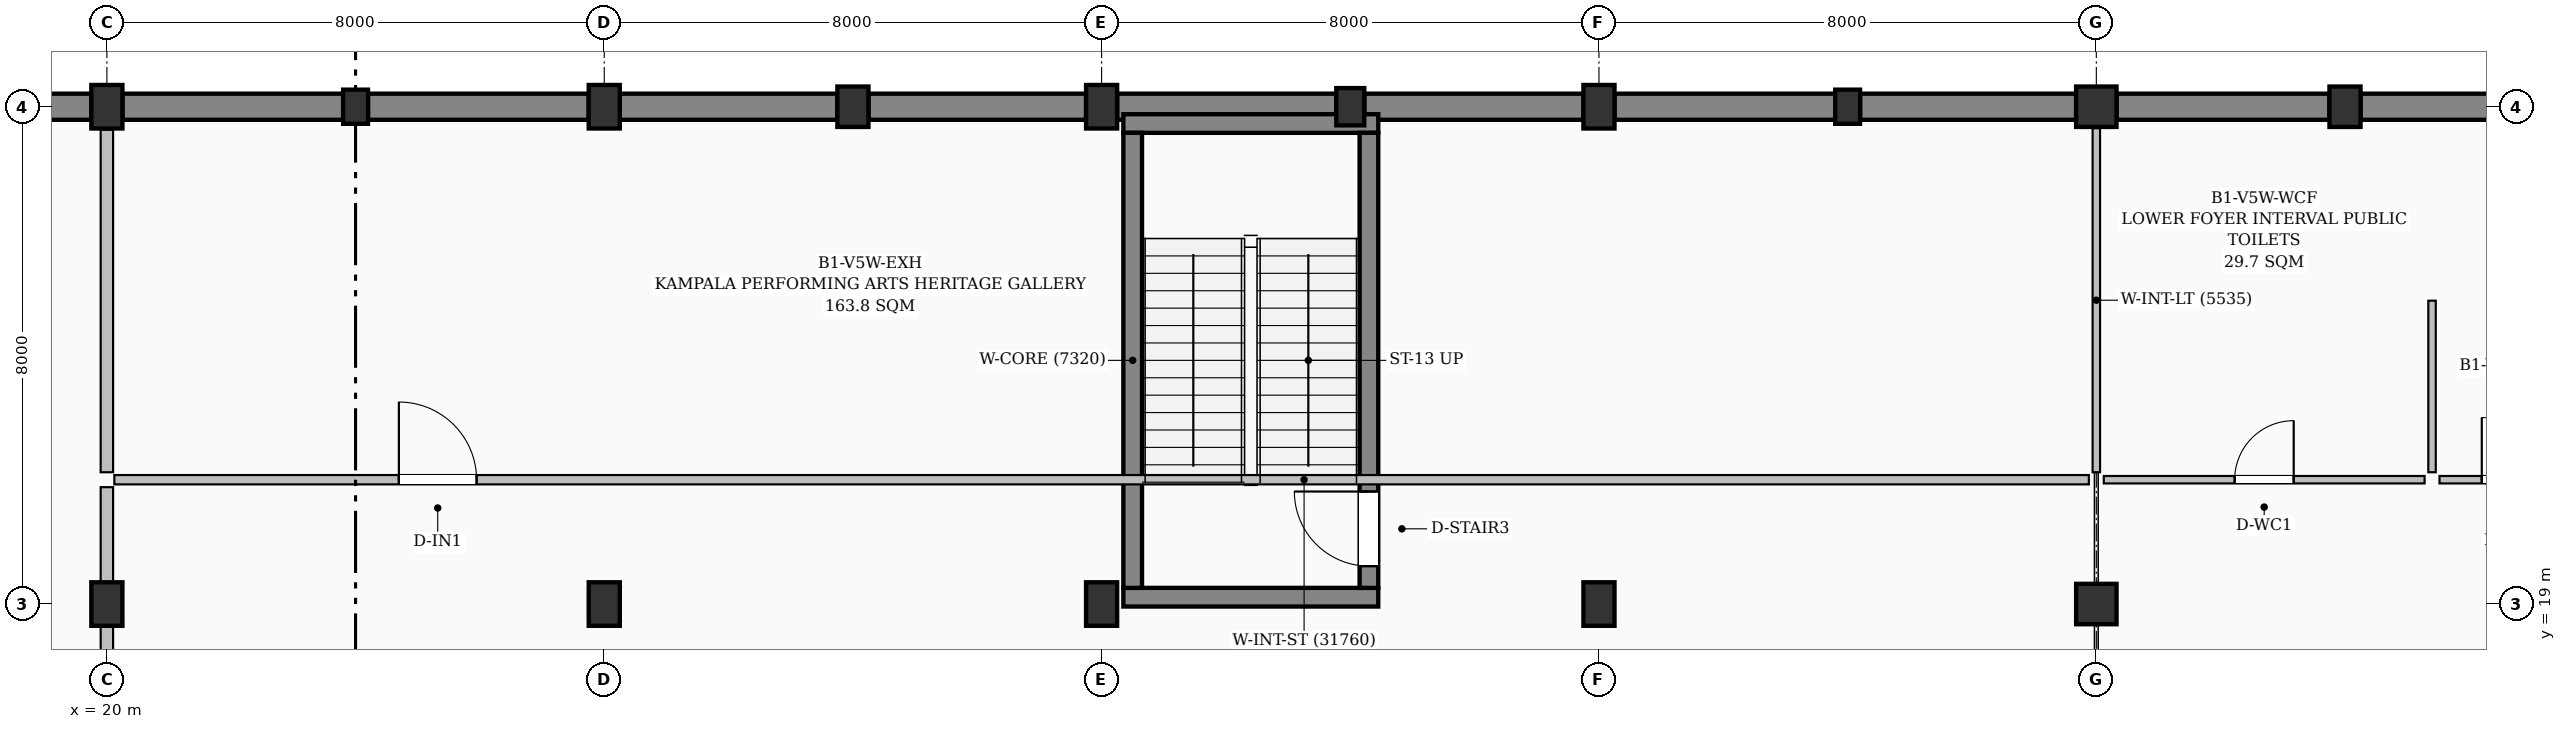
"""IFC4 building model, lengths in metres.
Left out: names, types, materials, properties, quantities, classifications, styles, units other than length and angle.
Written with IfcOpenShell. Run it as: python <this file> out.ifc"""

import sys

from ifc_helpers import new_model, si_unit, direction, frame, frame_2d, origin, origin_2d, place, context, subcontext, project, spatial, rectangle, extrude, element, fill, save


model = new_model("IFC4")
c1 = context("Model", 3, precision=1e-05, world=origin(), true_north=direction((0.0, 1.0)))
c2 = subcontext(c1, "Body", "Model", "MODEL_VIEW")
j1 = project(units=[si_unit("LENGTHUNIT", "METRE"), si_unit("PLANEANGLEUNIT", "RADIAN")], contexts=[c1])
p1 = place(None, origin())
s1 = spatial("IfcSite", under=j1, at=p1, CompositionType="ELEMENT")
p2 = place(p1, origin())
s2 = spatial("IfcBuilding", under=s1, at=p2, CompositionType="ELEMENT")
p3 = place(p2, frame((0.0, 0.0, -4.8)))
s3 = spatial("IfcBuildingStorey", under=s2, at=p3, CompositionType="ELEMENT", Elevation=-4.8)
for number, where, z_axis, x_axis in (
    (1, (20.0, 19.0, -0.38), (0.0, 0.0, 1.0), (1.0, 0.0, 0.0)),
    (2, (20.0, 27.0, -0.38), (0.0, 0.0, 1.0), (1.0, 0.0, 0.0)),
):
    element("IfcColumn", number, at=place(p3, frame(where, z_axis=z_axis, x_axis=x_axis)), inside=s3, PredefinedType="COLUMN", context=c2, shape_type="SweptSolid", body=[
        extrude(rectangle(XDim=0.5, YDim=0.7, at=origin_2d()), origin(), (0.0, 0.0, 1.0), 5.18),
    ])
p4 = place(p3, frame((24.0, 27.0, -0.38), z_axis=(0.0, 0.0, 1.0), x_axis=(1.0, 0.0, 0.0)))
e3 = element("IfcColumn", 3, at=p4, inside=s3, PredefinedType="PILASTER", context=c2, shape_type="SweptSolid", body=[
    extrude(rectangle(XDim=0.4, YDim=0.55, at=origin_2d()), origin(), (0.0, 0.0, 1.0), 5.18),
])
for number, where, z_axis, x_axis in (
    (4, (28.0, 19.0, -0.38), (0.0, 0.0, 1.0), (1.0, 0.0, 0.0)),
    (5, (28.0, 27.0, -0.38), (0.0, 0.0, 1.0), (1.0, 0.0, 0.0)),
):
    element("IfcColumn", number, at=place(p3, frame(where, z_axis=z_axis, x_axis=x_axis)), inside=s3, PredefinedType="COLUMN", context=c2, shape_type="SweptSolid", body=[
        extrude(rectangle(XDim=0.5, YDim=0.7, at=origin_2d()), origin(), (0.0, 0.0, 1.0), 5.18),
    ])
p5 = place(p3, frame((32.0, 27.0, -0.38), z_axis=(0.0, 0.0, 1.0), x_axis=(1.0, 0.0, 0.0)))
e6 = element("IfcColumn", 6, at=p5, inside=s3, PredefinedType="PILASTER", context=c2, shape_type="SweptSolid", body=[
    extrude(rectangle(XDim=0.5, YDim=0.65, at=origin_2d()), origin(), (0.0, 0.0, 1.0), 5.18),
])
for number, where, z_axis, x_axis in (
    (7, (36.0, 19.0, -0.38), (0.0, 0.0, 1.0), (1.0, 0.0, 0.0)),
    (8, (36.0, 27.0, -0.38), (0.0, 0.0, 1.0), (1.0, 0.0, 0.0)),
):
    element("IfcColumn", number, at=place(p3, frame(where, z_axis=z_axis, x_axis=x_axis)), inside=s3, PredefinedType="COLUMN", context=c2, shape_type="SweptSolid", body=[
        extrude(rectangle(XDim=0.5, YDim=0.7, at=origin_2d()), origin(), (0.0, 0.0, 1.0), 5.18),
    ])
p6 = place(p3, frame((40.0, 27.0, -0.38), z_axis=(0.0, 0.0, 1.0), x_axis=(1.0, 0.0, 0.0)))
e9 = element("IfcColumn", 9, at=p6, inside=s3, PredefinedType="PILASTER", context=c2, shape_type="SweptSolid", body=[
    extrude(rectangle(XDim=0.45, YDim=0.6, at=origin_2d()), origin(), (0.0, 0.0, 1.0), 5.18),
])
for number, where, z_axis, x_axis in (
    (10, (44.0, 19.0, -0.38), (0.0, 0.0, 1.0), (1.0, 0.0, 0.0)),
    (11, (44.0, 27.0, -0.38), (0.0, 0.0, 1.0), (1.0, 0.0, 0.0)),
):
    element("IfcColumn", number, at=place(p3, frame(where, z_axis=z_axis, x_axis=x_axis)), inside=s3, PredefinedType="COLUMN", context=c2, shape_type="SweptSolid", body=[
        extrude(rectangle(XDim=0.5, YDim=0.7, at=origin_2d()), origin(), (0.0, 0.0, 1.0), 5.18),
    ])
p7 = place(p3, frame((48.0, 27.0, -0.38), z_axis=(0.0, 0.0, 1.0), x_axis=(1.0, 0.0, 0.0)))
e12 = element("IfcColumn", 12, at=p7, inside=s3, PredefinedType="PILASTER", context=c2, shape_type="SweptSolid", body=[
    extrude(rectangle(XDim=0.4, YDim=0.55, at=origin_2d()), origin(), (0.0, 0.0, 1.0), 5.18),
])
for number, where, z_axis, x_axis in (
    (13, (52.0, 19.0, -0.38), (0.0, 0.0, 1.0), (1.0, 0.0, 0.0)),
    (14, (52.0, 27.0, -0.38), (0.0, 0.0, 1.0), (1.0, 0.0, 0.0)),
):
    element("IfcColumn", number, at=place(p3, frame(where, z_axis=z_axis, x_axis=x_axis)), inside=s3, PredefinedType="COLUMN", context=c2, shape_type="SweptSolid", body=[
        extrude(rectangle(XDim=0.65, YDim=0.65, at=origin_2d()), origin(), (0.0, 0.0, 1.0), 5.18),
    ])
p8 = place(p3, frame((56.0, 27.0, -0.38), z_axis=(0.0, 0.0, 1.0), x_axis=(1.0, 0.0, 0.0)))
e15 = element("IfcColumn", 15, at=p8, inside=s3, PredefinedType="PILASTER", context=c2, shape_type="SweptSolid", body=[
    extrude(rectangle(XDim=0.5, YDim=0.65, at=origin_2d()), origin(), (0.0, 0.0, 1.0), 5.18),
])
p9 = place(p3, frame((16.225, 27.0, 0.0), z_axis=(0.0, 0.0, 1.0), x_axis=(1.0, 0.0, 0.0)))
e16 = element("IfcWall", 16, at=p9, inside=s3, PredefinedType="USERDEFINED", context=c2, shape_type="SweptSolid", body=[
    extrude(rectangle(XDim=3.525, YDim=0.42, at=frame_2d((1.762, 0.0))), origin(), (0.0, 0.0, 1.0), 3.85),
])
for number, where, z_axis, x_axis in (
    (17, (20.25, 27.0, 0.0), (0.0, 0.0, 1.0), (1.0, 0.0, 0.0)),
    (18, (24.2, 27.0, 0.0), (0.0, 0.0, 1.0), (1.0, 0.0, 0.0)),
):
    element("IfcWall", number, at=place(p3, frame(where, z_axis=z_axis, x_axis=x_axis)), inside=s3, PredefinedType="USERDEFINED", context=c2, shape_type="SweptSolid", body=[
        extrude(rectangle(XDim=3.55, YDim=0.42, at=frame_2d((1.775, 0.0))), origin(), (0.0, 0.0, 1.0), 3.85),
    ])
for number, where, z_axis, x_axis in (
    (19, (28.25, 27.0, 0.0), (0.0, 0.0, 1.0), (1.0, 0.0, 0.0)),
    (20, (32.25, 27.0, 0.0), (0.0, 0.0, 1.0), (1.0, 0.0, 0.0)),
):
    element("IfcWall", number, at=place(p3, frame(where, z_axis=z_axis, x_axis=x_axis)), inside=s3, PredefinedType="USERDEFINED", context=c2, shape_type="SweptSolid", body=[
        extrude(rectangle(XDim=3.5, YDim=0.42, at=frame_2d((1.75, 0.0))), origin(), (0.0, 0.0, 1.0), 3.85),
    ])
for number, where, z_axis, x_axis in (
    (21, (36.25, 27.0, 0.0), (0.0, 0.0, 1.0), (1.0, 0.0, 0.0)),
    (22, (40.225, 27.0, 0.0), (0.0, 0.0, 1.0), (1.0, 0.0, 0.0)),
):
    element("IfcWall", number, at=place(p3, frame(where, z_axis=z_axis, x_axis=x_axis)), inside=s3, PredefinedType="USERDEFINED", context=c2, shape_type="SweptSolid", body=[
        extrude(rectangle(XDim=3.525, YDim=0.42, at=frame_2d((1.762, 0.0))), origin(), (0.0, 0.0, 1.0), 3.85),
    ])
p10 = place(p3, frame((44.25, 27.0, 0.0), z_axis=(0.0, 0.0, 1.0), x_axis=(1.0, 0.0, 0.0)))
e23 = element("IfcWall", 23, at=p10, inside=s3, PredefinedType="USERDEFINED", context=c2, shape_type="SweptSolid", body=[
    extrude(rectangle(XDim=3.55, YDim=0.42, at=frame_2d((1.775, 0.0))), origin(), (0.0, 0.0, 1.0), 3.85),
])
p11 = place(p3, frame((48.2, 27.0, 0.0), z_axis=(0.0, 0.0, 1.0), x_axis=(1.0, 0.0, 0.0)))
e24 = element("IfcWall", 24, at=p11, inside=s3, PredefinedType="USERDEFINED", context=c2, shape_type="SweptSolid", body=[
    extrude(rectangle(XDim=3.475, YDim=0.42, at=frame_2d((1.738, 0.0))), origin(), (0.0, 0.0, 1.0), 3.85),
])
for number, where, z_axis, x_axis in (
    (25, (52.325, 27.0, 0.0), (0.0, 0.0, 1.0), (1.0, 0.0, 0.0)),
    (26, (56.25, 27.0, 0.0), (0.0, 0.0, 1.0), (1.0, 0.0, 0.0)),
):
    element("IfcWall", number, at=place(p3, frame(where, z_axis=z_axis, x_axis=x_axis)), inside=s3, PredefinedType="USERDEFINED", context=c2, shape_type="SweptSolid", body=[
        extrude(rectangle(XDim=3.425, YDim=0.42, at=frame_2d((1.712, 0.0))), origin(), (0.0, 0.0, 1.0), 3.85),
    ])
for number, where, z_axis, x_axis in (
    (27, (36.35, 19.11, -0.38), (0.0, 0.0, 1.0), (1.0, 0.0, 0.0)),
    (28, (40.45, 26.73, -0.38), (0.0, 0.0, 1.0), (-1.0, 0.0, 0.0)),
):
    element("IfcWall", number, at=place(p3, frame(where, z_axis=z_axis, x_axis=x_axis)), inside=s3, PredefinedType="SHEAR", context=c2, shape_type="SweptSolid", body=[
        extrude(rectangle(XDim=4.1, YDim=0.3, at=frame_2d((2.05, 0.0))), origin(), (0.0, 0.0, 1.0), 4.88),
    ])
p12 = place(p3, frame((36.5, 19.26, -0.38), z_axis=(0.0, 0.0, 1.0), x_axis=(0.0, 1.0, 0.0)))
e29 = element("IfcWall", 29, at=p12, inside=s3, PredefinedType="SHEAR", context=c2, shape_type="SweptSolid", body=[
    extrude(rectangle(XDim=7.32, YDim=0.3, at=frame_2d((3.66, 0.0))), origin(), (0.0, 0.0, 1.0), 4.88),
])
p13 = place(p3, frame((40.3, 19.26, -0.38), z_axis=(0.0, 0.0, 1.0), x_axis=(0.0, 1.0, 0.0)))
e30 = element("IfcWall", 30, at=p13, inside=s3, PredefinedType="SHEAR", context=c2, shape_type="SweptSolid", body=[
    extrude(rectangle(XDim=7.32, YDim=0.3, at=frame_2d((3.66, 0.0))), origin(), (0.0, 0.0, 1.0), 4.88),
])
p14 = place(p13, frame((0.35, 0.0, 0.38)))
e31 = element("IfcOpeningElement", 31, at=p14, cuts=e30, PredefinedType="OPENING", context=c2, shape_type="SweptSolid", body=[
    extrude(rectangle(XDim=1.2, YDim=2.15, at=frame_2d((0.6, 1.075))), frame((0.0, 0.16, 0.0), z_axis=(0.0, -1.0, 0.0), x_axis=(1.0, 0.0, 0.0)), (0.0, 0.0, 1.0), 0.32),
])
p15 = place(p3, frame((20.12, 21.0, 0.0), z_axis=(0.0, 0.0, 1.0), x_axis=(1.0, 0.0, 0.0)))
e32 = element("IfcWall", 32, at=p15, inside=s3, PredefinedType="PARTITIONING", context=c2, shape_type="SweptSolid", body=[
    extrude(rectangle(XDim=31.76, YDim=0.15, at=frame_2d((15.88, 0.0))), origin(), (0.0, 0.0, 1.0), 4.5),
])
p16 = place(p15, frame((4.576, 0.0, 0.0)))
e33 = element("IfcOpeningElement", 33, at=p16, cuts=e32, PredefinedType="OPENING", context=c2, shape_type="SweptSolid", body=[
    extrude(rectangle(XDim=1.25, YDim=2.15, at=frame_2d((0.625, 1.075))), frame((0.0, 0.085, 0.0), z_axis=(0.0, -1.0, 0.0), x_axis=(1.0, 0.0, 0.0)), (0.0, 0.0, 1.0), 0.17),
])
p17 = place(p3, frame((52.12, 21.0, 0.0), z_axis=(0.0, 0.0, 1.0), x_axis=(1.0, 0.0, 0.0)))
e34 = element("IfcWall", 34, at=p17, inside=s3, PredefinedType="PARTITIONING", context=c2, shape_type="SweptSolid", body=[
    extrude(rectangle(XDim=5.16, YDim=0.12, at=frame_2d((2.58, 0.0))), origin(), (0.0, 0.0, 1.0), 4.5),
])
p18 = place(p17, frame((2.105, 0.0, 0.0)))
e35 = element("IfcOpeningElement", 35, at=p18, cuts=e34, PredefinedType="OPENING", context=c2, shape_type="SweptSolid", body=[
    extrude(rectangle(XDim=0.95, YDim=2.1, at=frame_2d((0.475, 1.05))), frame((0.0, 0.07, 0.0), z_axis=(0.0, -1.0, 0.0), x_axis=(1.0, 0.0, 0.0)), (0.0, 0.0, 1.0), 0.14),
])
p19 = place(p3, frame((57.52, 21.0, 0.0), z_axis=(0.0, 0.0, 1.0), x_axis=(1.0, 0.0, 0.0)))
e36 = element("IfcWall", 36, at=p19, inside=s3, PredefinedType="PARTITIONING", context=c2, shape_type="SweptSolid", body=[
    extrude(rectangle(XDim=2.36, YDim=0.12, at=frame_2d((1.18, 0.0))), origin(), (0.0, 0.0, 1.0), 4.5),
])
p20 = place(p19, frame((0.68, 0.0, 0.0)))
e37 = element("IfcOpeningElement", 37, at=p20, cuts=e36, PredefinedType="OPENING", context=c2, shape_type="SweptSolid", body=[
    extrude(rectangle(XDim=1.0, YDim=2.1, at=frame_2d((0.5, 1.05))), frame((0.0, 0.07, 0.0), z_axis=(0.0, -1.0, 0.0), x_axis=(1.0, 0.0, 0.0)), (0.0, 0.0, 1.0), 0.14),
])
p21 = place(p3, frame((20.0, 11.37, 0.0), z_axis=(0.0, 0.0, 1.0), x_axis=(0.0, 1.0, 0.0)))
e38 = element("IfcWall", 38, at=p21, inside=s3, PredefinedType="PARTITIONING", context=c2, shape_type="SweptSolid", body=[
    extrude(rectangle(XDim=9.51, YDim=0.2, at=frame_2d((4.755, 0.0))), origin(), (0.0, 0.0, 1.0), 4.095),
])
p22 = place(p21, frame((4.155, 0.0, 0.0)))
e39 = element("IfcOpeningElement", 39, at=p22, cuts=e38, PredefinedType="OPENING", context=c2, shape_type="SweptSolid", body=[
    extrude(rectangle(XDim=1.2, YDim=2.2, at=frame_2d((0.6, 1.1))), frame((0.0, 0.11, 0.0), z_axis=(0.0, -1.0, 0.0), x_axis=(1.0, 0.0, 0.0)), (0.0, 0.0, 1.0), 0.22),
])
p23 = place(p3, frame((52.0, 21.12, 0.0), z_axis=(0.0, 0.0, 1.0), x_axis=(0.0, 1.0, 0.0)))
e40 = element("IfcWall", 40, at=p23, inside=s3, PredefinedType="PARTITIONING", context=c2, shape_type="SweptSolid", body=[
    extrude(rectangle(XDim=5.535, YDim=0.12, at=frame_2d((2.768, 0.0))), origin(), (0.0, 0.0, 1.0), 3.885),
])
p24 = place(p3, frame((20.0, 21.12, 0.0), z_axis=(0.0, 0.0, 1.0), x_axis=(0.0, 1.0, 0.0)))
e41 = element("IfcWall", 41, at=p24, inside=s3, PredefinedType="PARTITIONING", context=c2, shape_type="SweptSolid", body=[
    extrude(rectangle(XDim=5.51, YDim=0.2, at=frame_2d((2.755, 0.0))), origin(), (0.0, 0.0, 1.0), 4.095),
])
p25 = place(p3, frame((57.4, 21.12, 0.0), z_axis=(0.0, 0.0, 1.0), x_axis=(0.0, 1.0, 0.0)))
e42 = element("IfcWall", 42, at=p25, inside=s3, PredefinedType="PARTITIONING", context=c2, shape_type="SweptSolid", body=[
    extrude(rectangle(XDim=2.76, YDim=0.12, at=frame_2d((1.38, 0.0))), origin(), (0.0, 0.0, 1.0), 4.5),
])
p26 = place(p14, origin())
e43 = element("IfcDoor", 43, at=p26, inside=s3, OperationType="SINGLE_SWING_RIGHT", PredefinedType="DOOR", context=c2, shape_type="SweptSolid", body=[
    extrude(rectangle(XDim=1.2, YDim=2.15, at=frame_2d((0.6, 1.075))), frame((0.0, 0.025, 0.0), z_axis=(0.0, -1.0, 0.0), x_axis=(1.0, 0.0, 0.0)), (0.0, 0.0, 1.0), 0.05),
])
fill(e31, e43)
p27 = place(p16, origin())
e44 = element("IfcDoor", 44, at=p27, inside=s3, OperationType="SINGLE_SWING_LEFT", PredefinedType="DOOR", context=c2, shape_type="SweptSolid", body=[
    extrude(rectangle(XDim=1.25, YDim=2.15, at=frame_2d((0.625, 1.075))), frame((0.0, 0.025, 0.0), z_axis=(0.0, -1.0, 0.0), x_axis=(1.0, 0.0, 0.0)), (0.0, 0.0, 1.0), 0.05),
])
fill(e33, e44)
p28 = place(p18, origin())
e45 = element("IfcDoor", 45, at=p28, inside=s3, OperationType="SINGLE_SWING_RIGHT", PredefinedType="DOOR", context=c2, shape_type="SweptSolid", body=[
    extrude(rectangle(XDim=0.95, YDim=2.1, at=frame_2d((0.475, 1.05))), frame((0.0, 0.025, 0.0), z_axis=(0.0, -1.0, 0.0), x_axis=(1.0, 0.0, 0.0)), (0.0, 0.0, 1.0), 0.05),
])
fill(e35, e45)
p29 = place(p20, origin())
e46 = element("IfcDoor", 46, at=p29, inside=s3, OperationType="SINGLE_SWING_LEFT", PredefinedType="DOOR", context=c2, shape_type="SweptSolid", body=[
    extrude(rectangle(XDim=1.0, YDim=2.1, at=frame_2d((0.5, 1.05))), frame((0.0, 0.025, 0.0), z_axis=(0.0, -1.0, 0.0), x_axis=(1.0, 0.0, 0.0)), (0.0, 0.0, 1.0), 0.05),
])
fill(e37, e46)
save(model, sys.argv[1])
